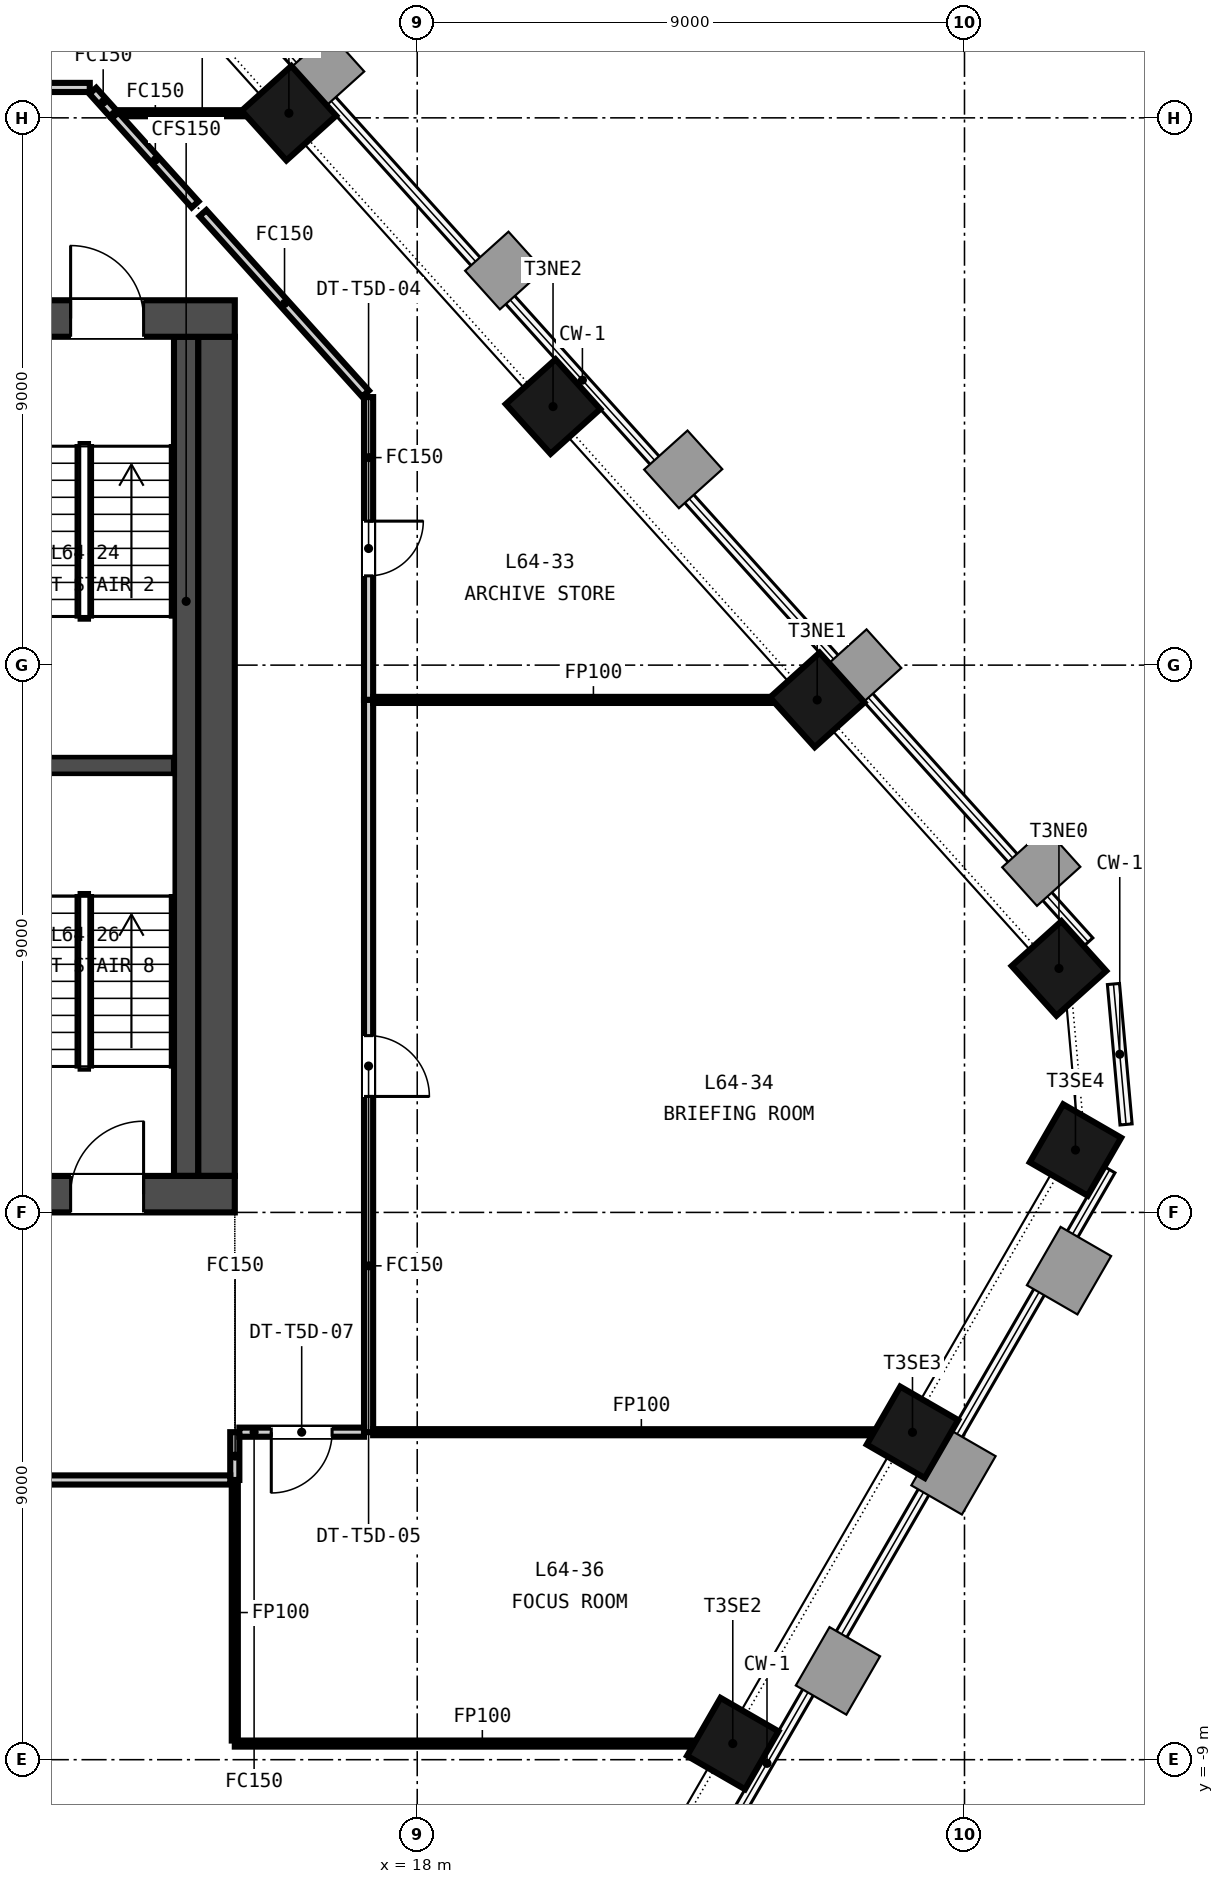
"""IFC4 building model, lengths in metres.
Left out: names, types, materials, properties, quantities, classifications, styles, units other than length and angle.
Written with IfcOpenShell. Run it as: python <this file> out.ifc"""

import sys

from ifc_helpers import new_model, si_unit, direction, frame, frame_2d, origin, origin_2d, place, context, subcontext, project, spatial, rectangle, extrude, element, fill, save


model = new_model("IFC4")
c1 = context("Model", 3, precision=1e-05, world=origin(), true_north=direction((0.0, 1.0)))
c2 = subcontext(c1, "Body", "Model", "MODEL_VIEW")
j1 = project(units=[si_unit("LENGTHUNIT", "METRE"), si_unit("PLANEANGLEUNIT", "RADIAN")], contexts=[c1])
p1 = place(None, origin())
s1 = spatial("IfcSite", under=j1, at=p1, CompositionType="ELEMENT")
p2 = place(p1, origin())
s2 = spatial("IfcBuilding", under=s1, at=p2, CompositionType="ELEMENT")
p3 = place(p2, frame((0.0, 0.0, 252.8)))
s3 = spatial("IfcBuildingStorey", under=s2, at=p3, CompositionType="ELEMENT", Elevation=252.8)
p4 = place(p3, frame((-15.0, 0.3, -0.15), z_axis=(0.0, 0.0, 1.0), x_axis=(1.0, 0.0, 0.0)))
e1 = element("IfcWall", 1, at=p4, inside=s3, PredefinedType="SOLIDWALL", context=c2, shape_type="SweptSolid", body=[
    extrude(rectangle(XDim=30.0, YDim=0.6, at=frame_2d((15.0, 0.0))), origin(), (0.0, 0.0, 1.0), 3.5),
])
p5 = place(p4, frame((5.8, 0.0, 0.15)))
e2 = element("IfcOpeningElement", 2, at=p5, cuts=e1, PredefinedType="OPENING", context=c2, shape_type="SweptSolid", body=[
    extrude(rectangle(XDim=2.4, YDim=2.4, at=frame_2d((1.2, 1.2))), frame((0.0, 0.31, 0.0), z_axis=(0.0, -1.0, 0.0), x_axis=(1.0, 0.0, 0.0)), (0.0, 0.0, 1.0), 0.62),
])
p6 = place(p4, frame((13.8, 0.0, 0.15)))
e3 = element("IfcOpeningElement", 3, at=p6, cuts=e1, PredefinedType="OPENING", context=c2, shape_type="SweptSolid", body=[
    extrude(rectangle(XDim=2.4, YDim=2.4, at=frame_2d((1.2, 1.2))), frame((0.0, 0.31, 0.0), z_axis=(0.0, -1.0, 0.0), x_axis=(1.0, 0.0, 0.0)), (0.0, 0.0, 1.0), 0.62),
])
p7 = place(p4, frame((21.8, 0.0, 0.15)))
e4 = element("IfcOpeningElement", 4, at=p7, cuts=e1, PredefinedType="OPENING", context=c2, shape_type="SweptSolid", body=[
    extrude(rectangle(XDim=2.4, YDim=2.4, at=frame_2d((1.2, 1.2))), frame((0.0, 0.31, 0.0), z_axis=(0.0, -1.0, 0.0), x_axis=(1.0, 0.0, 0.0)), (0.0, 0.0, 1.0), 0.62),
])
p8 = place(p4, frame((1.5, 0.0, 0.15)))
e5 = element("IfcOpeningElement", 5, at=p8, cuts=e1, PredefinedType="OPENING", context=c2, shape_type="SweptSolid", body=[
    extrude(rectangle(XDim=1.2, YDim=2.1, at=frame_2d((0.6, 1.05))), frame((0.0, 0.31, 0.0), z_axis=(0.0, -1.0, 0.0), x_axis=(1.0, 0.0, 0.0)), (0.0, 0.0, 1.0), 0.62),
])
p9 = place(p4, frame((27.3, 0.0, 0.15)))
e6 = element("IfcOpeningElement", 6, at=p9, cuts=e1, PredefinedType="OPENING", context=c2, shape_type="SweptSolid", body=[
    extrude(rectangle(XDim=1.2, YDim=2.1, at=frame_2d((0.6, 1.05))), frame((0.0, 0.31, 0.0), z_axis=(0.0, -1.0, 0.0), x_axis=(1.0, 0.0, 0.0)), (0.0, 0.0, 1.0), 0.62),
])
p10 = place(p3, frame((-15.0, 14.7, -0.15), z_axis=(0.0, 0.0, 1.0), x_axis=(1.0, 0.0, 0.0)))
e7 = element("IfcWall", 7, at=p10, inside=s3, PredefinedType="SOLIDWALL", context=c2, shape_type="SweptSolid", body=[
    extrude(rectangle(XDim=30.0, YDim=0.6, at=frame_2d((15.0, 0.0))), origin(), (0.0, 0.0, 1.0), 3.5),
])
p11 = place(p10, frame((9.25, 0.0, 0.15)))
e8 = element("IfcOpeningElement", 8, at=p11, cuts=e7, PredefinedType="OPENING", context=c2, shape_type="SweptSolid", body=[
    extrude(rectangle(XDim=1.5, YDim=2.1, at=frame_2d((0.75, 1.05))), frame((0.0, 0.31, 0.0), z_axis=(0.0, -1.0, 0.0), x_axis=(1.0, 0.0, 0.0)), (0.0, 0.0, 1.0), 0.62),
])
p12 = place(p10, frame((19.4, 0.0, 0.15)))
e9 = element("IfcOpeningElement", 9, at=p12, cuts=e7, PredefinedType="OPENING", context=c2, shape_type="SweptSolid", body=[
    extrude(rectangle(XDim=1.5, YDim=2.1, at=frame_2d((0.75, 1.05))), frame((0.0, 0.31, 0.0), z_axis=(0.0, -1.0, 0.0), x_axis=(1.0, 0.0, 0.0)), (0.0, 0.0, 1.0), 0.62),
])
p13 = place(p10, frame((1.5, 0.0, 0.15)))
e10 = element("IfcOpeningElement", 10, at=p13, cuts=e7, PredefinedType="OPENING", context=c2, shape_type="SweptSolid", body=[
    extrude(rectangle(XDim=1.2, YDim=2.1, at=frame_2d((0.6, 1.05))), frame((0.0, 0.31, 0.0), z_axis=(0.0, -1.0, 0.0), x_axis=(1.0, 0.0, 0.0)), (0.0, 0.0, 1.0), 0.62),
])
p14 = place(p10, frame((27.3, 0.0, 0.15)))
e11 = element("IfcOpeningElement", 11, at=p14, cuts=e7, PredefinedType="OPENING", context=c2, shape_type="SweptSolid", body=[
    extrude(rectangle(XDim=1.2, YDim=2.1, at=frame_2d((0.6, 1.05))), frame((0.0, 0.31, 0.0), z_axis=(0.0, -1.0, 0.0), x_axis=(1.0, 0.0, 0.0)), (0.0, 0.0, 1.0), 0.62),
])
p15 = place(p3, frame((14.7, 0.6, -0.15), z_axis=(0.0, 0.0, 1.0), x_axis=(0.0, 1.0, 0.0)))
e12 = element("IfcWall", 12, at=p15, inside=s3, PredefinedType="SOLIDWALL", context=c2, shape_type="SweptSolid", body=[
    extrude(rectangle(XDim=13.8, YDim=0.6, at=frame_2d((6.9, 0.0))), origin(), (0.0, 0.0, 1.0), 3.5),
])
for number, where, z_axis, x_axis in (
    (13, (23.189, -8.735, -0.15), (0.0, 0.0, 1.0), (0.5, 0.866, 0.0)),
    (14, (26.145, -3.616, -0.15), (0.0, 0.0, 1.0), (0.5, 0.866, 0.0)),
    (15, (28.825, 1.026, -0.15), (0.0, 0.0, 1.0), (0.5, 0.866, 0.0)),
    (16, (28.553, 4.012, -0.15), (0.0, 0.0, 1.0), (-0.669, 0.743, 0.0)),
    (17, (24.577, 8.427, -0.15), (0.0, 0.0, 1.0), (-0.669, 0.743, 0.0)),
    (18, (20.233, 13.252, -0.15), (0.0, 0.0, 1.0), (-0.669, 0.743, 0.0)),
    (19, (15.89, 18.076, -0.15), (0.0, 0.0, 1.0), (-0.669, 0.743, 0.0)),
):
    element("IfcColumn", number, at=place(p3, frame(where, z_axis=z_axis, x_axis=x_axis)), inside=s3, PredefinedType="COLUMN", context=c2, shape_type="SweptSolid", body=[
        extrude(rectangle(XDim=1.1, YDim=1.1, at=origin_2d()), origin(), (0.0, 0.0, 1.0), 3.5),
    ])
p16 = place(p3, frame((11.05, 7.35, 0.0), z_axis=(0.0, 0.0, 1.0), x_axis=(1.0, 0.0, 0.0)))
e20 = element("IfcWall", 20, at=p16, inside=s3, PredefinedType="SOLIDWALL", context=c2, shape_type="SweptSolid", body=[
    extrude(rectangle(XDim=2.95, YDim=0.3, at=frame_2d((1.475, 0.0))), origin(), (0.0, 0.0, 1.0), 3.35),
])
p17 = place(p3, frame((14.2, 0.6, 0.0), z_axis=(0.0, 0.0, 1.0), x_axis=(0.0, 1.0, 0.0)))
e21 = element("IfcWall", 21, at=p17, inside=s3, PredefinedType="SOLIDWALL", context=c2, shape_type="SweptSolid", body=[
    extrude(rectangle(XDim=13.8, YDim=0.4, at=frame_2d((6.9, 0.0))), origin(), (0.0, 0.0, 1.0), 3.35),
])
p18 = place(p3, frame((15.0, -3.614, 0.0), z_axis=(0.0, 0.0, 1.0), x_axis=(0.0, -1.0, 0.0)))
e22 = element("IfcWall", 22, at=p18, inside=s3, PredefinedType="PARTITIONING", context=c2, shape_type="SweptSolid", body=[
    extrude(rectangle(XDim=0.786, YDim=0.15, at=frame_2d((0.393, 0.0))), origin(), (0.0, 0.0, 1.0), 2.601),
])
p19 = place(p3, frame((14.925, -4.4, 0.0), z_axis=(0.0, 0.0, 1.0), x_axis=(-1.0, 0.0, 0.0)))
e23 = element("IfcWall", 23, at=p19, inside=s3, PredefinedType="PARTITIONING", context=c2, shape_type="SweptSolid", body=[
    extrude(rectangle(XDim=9.033, YDim=0.15, at=frame_2d((4.517, 0.0))), origin(), (0.0, 0.0, 1.0), 2.601),
])
p20 = place(p19, frame((3.616, 0.0, 0.0)))
e24 = element("IfcOpeningElement", 24, at=p20, cuts=e23, PredefinedType="OPENING", context=c2, shape_type="SweptSolid", body=[
    extrude(rectangle(XDim=1.8, YDim=2.1, at=frame_2d((0.9, 1.05))), frame((0.0, 0.085, 0.0), z_axis=(0.0, -1.0, 0.0), x_axis=(1.0, 0.0, 0.0)), (0.0, 0.0, 1.0), 0.17),
])
p21 = place(p3, frame((17.2, 13.408, 0.0), z_axis=(0.0, 0.0, 1.0), x_axis=(0.0, -1.0, 0.0)))
e25 = element("IfcWall", 25, at=p21, inside=s3, PredefinedType="PARTITIONING", context=c2, shape_type="SweptSolid", body=[
    extrude(rectangle(XDim=4.98, YDim=0.15, at=frame_2d((2.49, 0.0))), origin(), (0.0, 0.0, 1.0), 2.601),
])
p22 = place(p21, frame((2.04, 0.0, 0.0)))
e26 = element("IfcOpeningElement", 26, at=p22, cuts=e25, PredefinedType="OPENING", context=c2, shape_type="SweptSolid", body=[
    extrude(rectangle(XDim=0.9, YDim=2.1, at=frame_2d((0.45, 1.05))), frame((0.0, 0.085, 0.0), z_axis=(0.0, -1.0, 0.0), x_axis=(1.0, 0.0, 0.0)), (0.0, 0.0, 1.0), 0.17),
])
p23 = place(p3, frame((17.2, 8.428, 0.0), z_axis=(0.0, 0.0, 1.0), x_axis=(0.0, -1.0, 0.0)))
e27 = element("IfcWall", 27, at=p23, inside=s3, PredefinedType="PARTITIONING", context=c2, shape_type="SweptSolid", body=[
    extrude(rectangle(XDim=12.042, YDim=0.15, at=frame_2d((6.021, 0.0))), origin(), (0.0, 0.0, 1.0), 2.601),
])
p24 = place(p23, frame((5.521, 0.0, 0.0)))
e28 = element("IfcOpeningElement", 28, at=p24, cuts=e27, PredefinedType="OPENING", context=c2, shape_type="SweptSolid", body=[
    extrude(rectangle(XDim=1.0, YDim=2.1, at=frame_2d((0.5, 1.05))), frame((0.0, 0.085, 0.0), z_axis=(0.0, -1.0, 0.0), x_axis=(1.0, 0.0, 0.0)), (0.0, 0.0, 1.0), 0.17),
])
p25 = place(p3, frame((17.125, -3.614, 0.0), z_axis=(0.0, 0.0, 1.0), x_axis=(-1.0, 0.0, 0.0)))
e29 = element("IfcWall", 29, at=p25, inside=s3, PredefinedType="PARTITIONING", context=c2, shape_type="SweptSolid", body=[
    extrude(rectangle(XDim=2.05, YDim=0.15, at=frame_2d((1.025, 0.0))), origin(), (0.0, 0.0, 1.0), 2.601),
])
p26 = place(p25, frame((0.525, 0.0, 0.0)))
e30 = element("IfcOpeningElement", 30, at=p26, cuts=e29, PredefinedType="OPENING", context=c2, shape_type="SweptSolid", body=[
    extrude(rectangle(XDim=1.0, YDim=2.1, at=frame_2d((0.5, 1.05))), frame((0.0, 0.085, 0.0), z_axis=(0.0, -1.0, 0.0), x_axis=(1.0, 0.0, 0.0)), (0.0, 0.0, 1.0), 0.17),
])
p27 = place(p3, frame((-3.98, 18.5, 0.0), z_axis=(0.0, 0.0, 1.0), x_axis=(1.0, 0.0, 0.0)))
e31 = element("IfcWall", 31, at=p27, inside=s3, PredefinedType="PARTITIONING", context=c2, shape_type="SweptSolid", body=[
    extrude(rectangle(XDim=16.595, YDim=0.15, at=frame_2d((8.297, 0.0))), origin(), (0.0, 0.0, 1.0), 2.601),
])
p28 = place(p27, frame((7.847, 0.0, 0.0)))
e32 = element("IfcOpeningElement", 32, at=p28, cuts=e31, PredefinedType="OPENING", context=c2, shape_type="SweptSolid", body=[
    extrude(rectangle(XDim=0.9, YDim=2.1, at=frame_2d((0.45, 1.05))), frame((0.0, 0.085, 0.0), z_axis=(0.0, -1.0, 0.0), x_axis=(1.0, 0.0, 0.0)), (0.0, 0.0, 1.0), 0.17),
])
p29 = place(p3, frame((12.665, 18.444, 0.0), z_axis=(0.0, 0.0, 1.0), x_axis=(0.668637752652, -0.743588297197, 0.0)))
e33 = element("IfcWall", 33, at=p29, inside=s3, PredefinedType="PARTITIONING", context=c2, shape_type="SweptSolid", body=[
    extrude(rectangle(XDim=0.495, YDim=0.15, at=frame_2d((0.248, 0.0))), origin(), (0.0, 0.0, 1.0), 2.601),
])
p30 = place(p3, frame((13.097, 18.076, 0.0), z_axis=(0.0, 0.0, 1.0), x_axis=(1.0, 0.0, 0.0)))
e34 = element("IfcWall", 34, at=p30, inside=s3, PredefinedType="PARTITIONING", context=c2, shape_type="SweptSolid", body=[
    extrude(rectangle(XDim=2.725, YDim=0.1, at=frame_2d((1.363, 0.0))), origin(), (0.0, 0.0, 1.0), 2.601),
])
p31 = place(p3, frame((13.03, 18.039, 0.0), z_axis=(0.0, 0.0, 1.0), x_axis=(0.669183955235, -0.743096786466, 0.0)))
e35 = element("IfcWall", 35, at=p31, inside=s3, PredefinedType="PARTITIONING", context=c2, shape_type="SweptSolid", body=[
    extrude(rectangle(XDim=1.969, YDim=0.15, at=frame_2d((0.984, 0.0))), origin(), (0.0, 0.0, 1.0), 2.601),
])
p32 = place(p3, frame((14.476, 16.433, 0.0), z_axis=(0.0, 0.0, 1.0), x_axis=(0.669204384193, -0.743078388985, 0.0)))
e36 = element("IfcWall", 36, at=p32, inside=s3, PredefinedType="PARTITIONING", context=c2, shape_type="SweptSolid", body=[
    extrude(rectangle(XDim=3.996, YDim=0.15, at=frame_2d((1.998, 0.0))), origin(), (0.0, 0.0, 1.0), 2.601),
])
p33 = place(p3, frame((17.275, 8.428, 0.0), z_axis=(0.0, 0.0, 1.0), x_axis=(1.0, 0.0, 0.0)))
e37 = element("IfcWall", 37, at=p33, inside=s3, PredefinedType="PARTITIONING", context=c2, shape_type="SweptSolid", body=[
    extrude(rectangle(XDim=7.235, YDim=0.1, at=frame_2d((3.618, 0.0))), origin(), (0.0, 0.0, 1.0), 2.601),
])
p34 = place(p3, frame((17.275, -3.614, 0.0), z_axis=(0.0, 0.0, 1.0), x_axis=(0.999999975437, -0.000221643481, 0.0)))
e38 = element("IfcWall", 38, at=p34, inside=s3, PredefinedType="PARTITIONING", context=c2, shape_type="SweptSolid", body=[
    extrude(rectangle(XDim=8.812, YDim=0.1, at=frame_2d((4.406, 0.0))), origin(), (0.0, 0.0, 1.0), 2.601),
])
p35 = place(p3, frame((15.0, -8.735, 0.0), z_axis=(0.0, 0.0, 1.0), x_axis=(1.0, 0.0, 0.0)))
e39 = element("IfcWall", 39, at=p35, inside=s3, PredefinedType="PARTITIONING", context=c2, shape_type="SweptSolid", body=[
    extrude(rectangle(XDim=8.132, YDim=0.1, at=frame_2d((4.066, 0.0))), origin(), (0.0, 0.0, 1.0), 2.601),
])
p36 = place(p3, frame((15.0, -8.685, 0.0), z_axis=(0.0, 0.0, 1.0), x_axis=(0.0, 1.0, 0.0)))
e40 = element("IfcWall", 40, at=p36, inside=s3, PredefinedType="PARTITIONING", context=c2, shape_type="SweptSolid", body=[
    extrude(rectangle(XDim=4.21, YDim=0.1, at=frame_2d((2.105, 0.0))), origin(), (0.0, 0.0, 1.0), 2.601),
])
p37 = place(p14, origin())
e41 = element("IfcDoor", 41, at=p37, inside=s3, OperationType="SINGLE_SWING_LEFT", PredefinedType="DOOR", context=c2, shape_type="SweptSolid", body=[
    extrude(rectangle(XDim=1.2, YDim=2.1, at=frame_2d((0.6, 1.05))), frame((0.0, 0.025, 0.0), z_axis=(0.0, -1.0, 0.0), x_axis=(1.0, 0.0, 0.0)), (0.0, 0.0, 1.0), 0.05),
])
fill(e11, e41)
p38 = place(p9, origin())
e42 = element("IfcDoor", 42, at=p38, inside=s3, OperationType="SINGLE_SWING_RIGHT", PredefinedType="DOOR", context=c2, shape_type="SweptSolid", body=[
    extrude(rectangle(XDim=1.2, YDim=2.1, at=frame_2d((0.6, 1.05))), frame((0.0, 0.025, 0.0), z_axis=(0.0, -1.0, 0.0), x_axis=(1.0, 0.0, 0.0)), (0.0, 0.0, 1.0), 0.05),
])
fill(e6, e42)
p39 = place(p22, origin())
e43 = element("IfcDoor", 43, at=p39, inside=s3, OperationType="SINGLE_SWING_LEFT", PredefinedType="DOOR", context=c2, shape_type="SweptSolid", body=[
    extrude(rectangle(XDim=0.9, YDim=2.1, at=frame_2d((0.45, 1.05))), frame((0.0, 0.025, 0.0), z_axis=(0.0, -1.0, 0.0), x_axis=(1.0, 0.0, 0.0)), (0.0, 0.0, 1.0), 0.05),
])
fill(e26, e43)
p40 = place(p24, origin())
e44 = element("IfcDoor", 44, at=p40, inside=s3, OperationType="SINGLE_SWING_RIGHT", PredefinedType="DOOR", context=c2, shape_type="SweptSolid", body=[
    extrude(rectangle(XDim=1.0, YDim=2.1, at=frame_2d((0.5, 1.05))), frame((0.0, 0.025, 0.0), z_axis=(0.0, -1.0, 0.0), x_axis=(1.0, 0.0, 0.0)), (0.0, 0.0, 1.0), 0.05),
])
fill(e28, e44)
p41 = place(p26, origin())
e45 = element("IfcDoor", 45, at=p41, inside=s3, OperationType="SINGLE_SWING_RIGHT", PredefinedType="DOOR", context=c2, shape_type="SweptSolid", body=[
    extrude(rectangle(XDim=1.0, YDim=2.1, at=frame_2d((0.5, 1.05))), frame((0.0, 0.025, 0.0), z_axis=(0.0, -1.0, 0.0), x_axis=(1.0, 0.0, 0.0)), (0.0, 0.0, 1.0), 0.05),
])
fill(e30, e45)
save(model, sys.argv[1])
